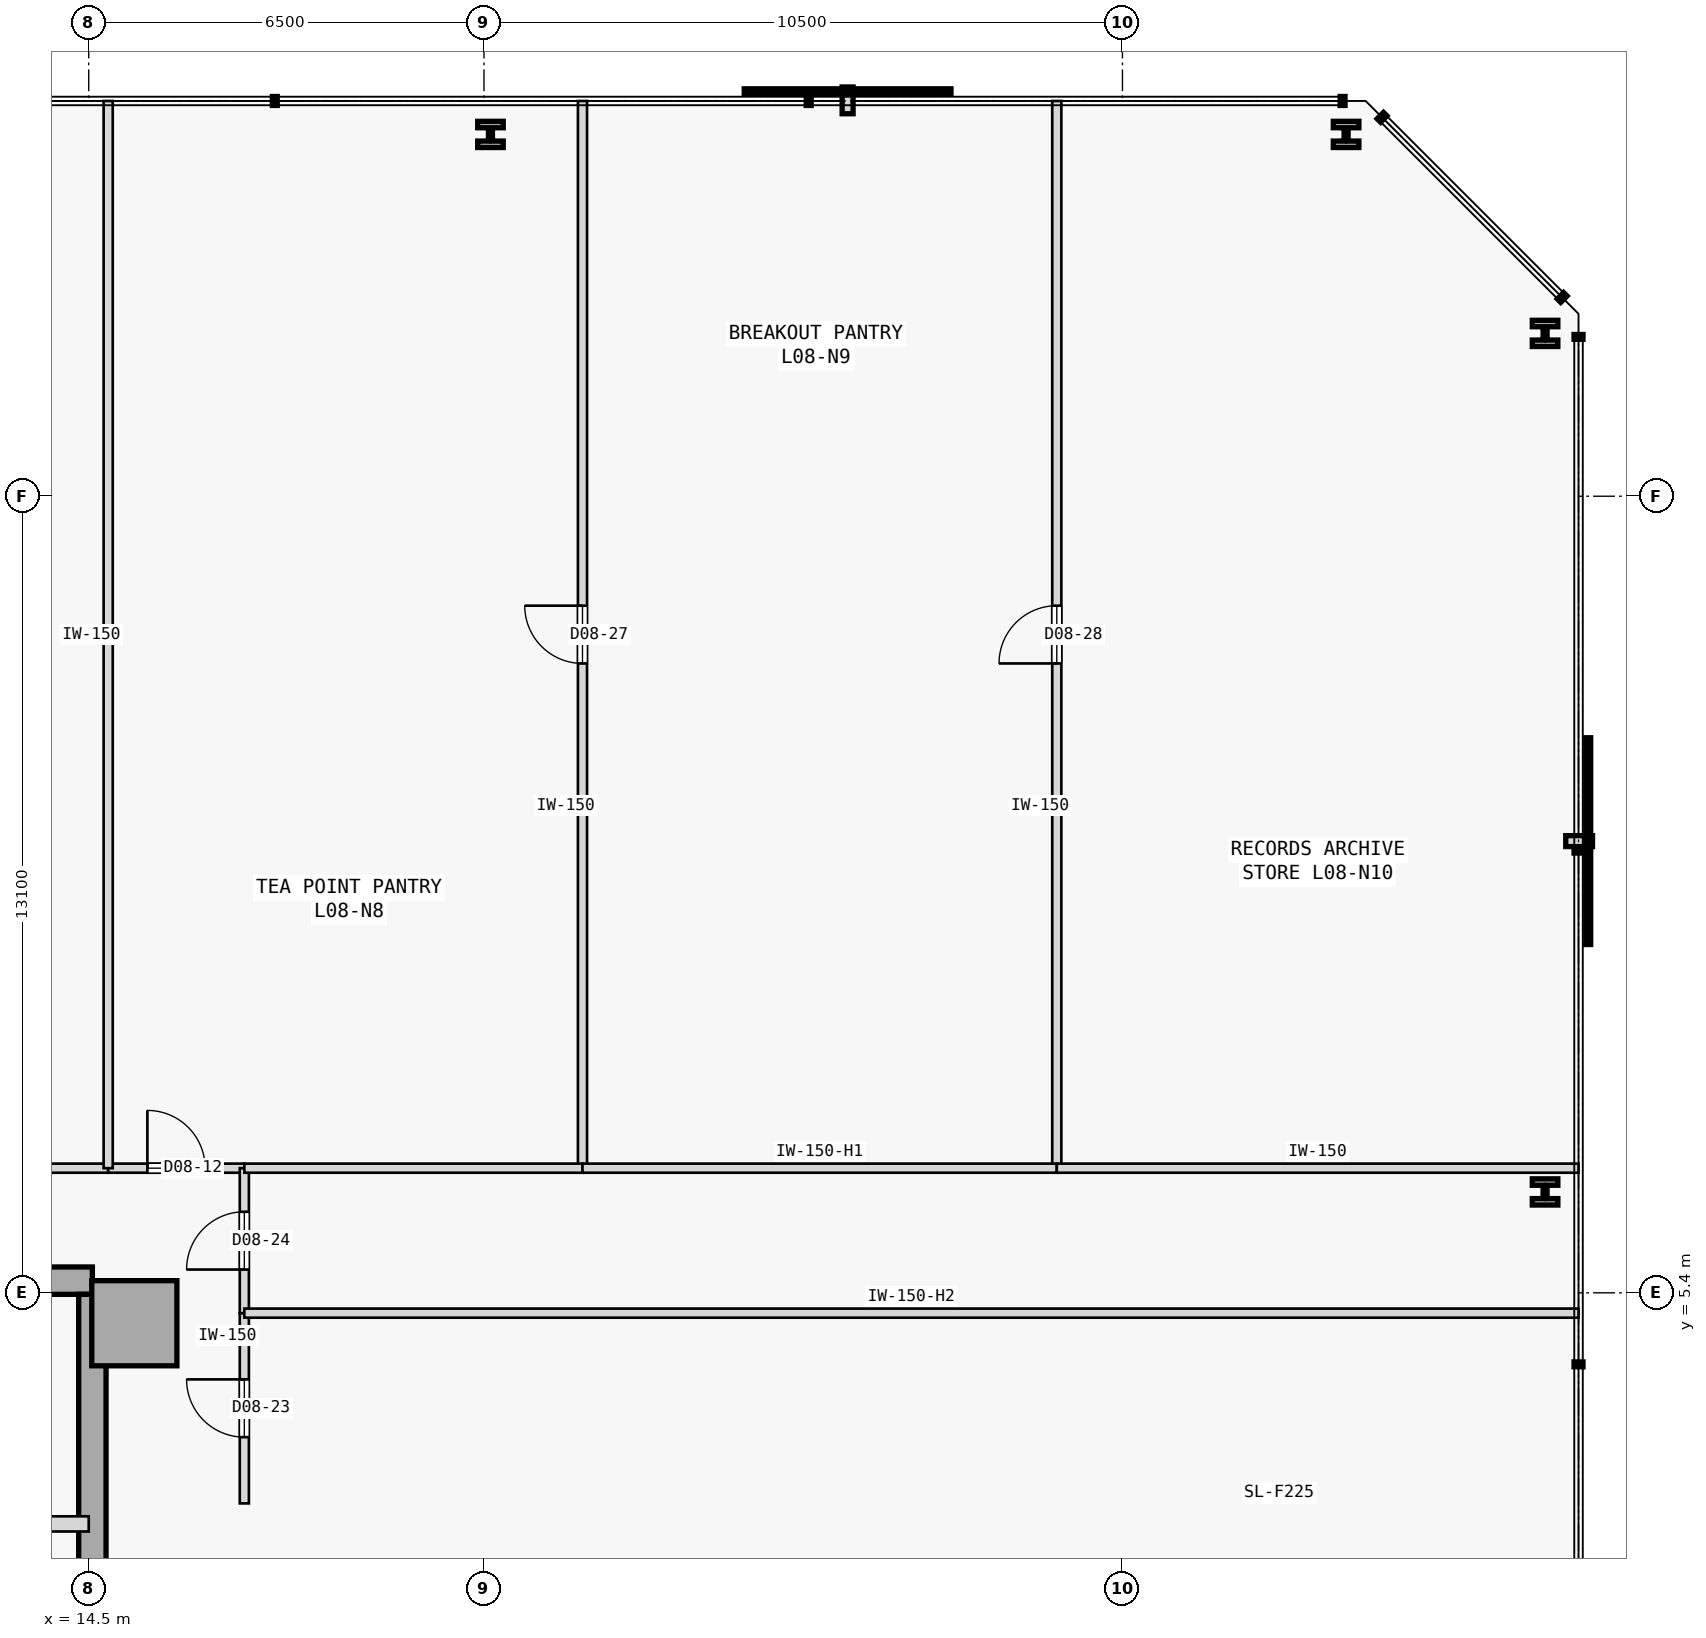
"""IFC4 building model, lengths in metres.
Left out: names, types, materials, properties, quantities, classifications, styles, units other than length and angle.
Written with IfcOpenShell. Run it as: python <this file> out.ifc"""

import sys

from ifc_helpers import new_model, si_unit, direction, frame, frame_2d, origin, origin_2d, place, context, subcontext, project, spatial, rectangle, i_section, extrude, element, fill, save


model = new_model("IFC4")
c1 = context("Model", 3, precision=1e-05, world=origin(), true_north=direction((0.0, 1.0)))
c2 = subcontext(c1, "Body", "Model", "MODEL_VIEW")
j1 = project(units=[si_unit("LENGTHUNIT", "METRE"), si_unit("PLANEANGLEUNIT", "RADIAN")], contexts=[c1])
p1 = place(None, origin())
s1 = spatial("IfcSite", under=j1, at=p1, CompositionType="ELEMENT")
p2 = place(p1, origin())
s2 = spatial("IfcBuilding", under=s1, at=p2, CompositionType="ELEMENT")
p3 = place(p2, frame((0.0, 0.0, 37.0)))
s3 = spatial("IfcBuildingStorey", under=s2, at=p3, CompositionType="ELEMENT", Elevation=37.0)
p4 = place(p3, frame((15.25, 4.9, 0.0), z_axis=(0.0, 0.0, 1.0), x_axis=(1.0, 0.0, 0.0)))
e1 = element("IfcColumn", 1, at=p4, inside=s3, PredefinedType="COLUMN", context=c2, shape_type="SweptSolid", body=[
    extrude(rectangle(XDim=1.4, YDim=1.4, at=origin_2d()), origin(), (0.0, 0.0, 1.0), 3.8),
])
p5 = place(p3, frame((3.15, 5.6, 0.0), z_axis=(0.0, 0.0, 1.0), x_axis=(1.0, 0.0, 0.0)))
e2 = element("IfcWall", 2, at=p5, inside=s3, PredefinedType="SHEAR", context=c2, shape_type="SweptSolid", body=[
    extrude(rectangle(XDim=11.41, YDim=0.45, at=frame_2d((5.705, 0.0))), origin(), (0.0, 0.0, 1.0), 3.575),
])
p6 = place(p3, frame((14.56, -5.375, 0.0), z_axis=(0.0, 0.0, 1.0), x_axis=(0.0, 1.0, 0.0)))
e3 = element("IfcWall", 3, at=p6, inside=s3, PredefinedType="SHEAR", context=c2, shape_type="SweptSolid", body=[
    extrude(rectangle(XDim=10.75, YDim=0.45, at=frame_2d((5.375, 0.0))), origin(), (0.0, 0.0, 1.0), 3.575),
])
for number, where, z_axis, x_axis in (
    (4, (38.45, 7.059, 0.0), (0.0, 0.0, 1.0), (1.0, 0.0, 0.0)),
    (5, (38.45, 21.178, 0.0), (0.0, 0.0, 1.0), (1.0, 0.0, 0.0)),
    (6, (35.178, 24.45, 0.0), (0.0, 0.0, 1.0), (1.0, 0.0, 0.0)),
    (7, (21.107, 24.45, 0.0), (0.0, 0.0, 1.0), (1.0, 0.0, 0.0)),
):
    element("IfcColumn", number, at=place(p3, frame(where, z_axis=z_axis, x_axis=x_axis)), inside=s3, PredefinedType="COLUMN", context=c2, shape_type="SweptSolid", body=[
        extrude(i_section(OverallWidth=0.42, OverallDepth=0.431, WebThickness=0.065, FlangeThickness=0.106, FilletRadius=0.015, at=origin_2d()), origin(), (0.0, 0.0, 1.0), 3.8),
    ])
p7 = place(p3, frame((10.9, 1.6, 0.0), z_axis=(0.0, 0.0, 1.0), x_axis=(1.0, 0.0, 0.0)))
e8 = element("IfcWall", 8, at=p7, inside=s3, PredefinedType="STANDARD", context=c2, shape_type="SweptSolid", body=[
    extrude(rectangle(XDim=3.6, YDim=0.25, at=frame_2d((1.8, 0.0))), origin(), (0.0, 0.0, 1.0), 3.575),
])
p8 = place(p7, frame((1.62, 0.0, 0.0)))
e9 = element("IfcOpeningElement", 9, at=p8, cuts=e8, PredefinedType="OPENING", context=c2, shape_type="SweptSolid", body=[
    extrude(rectangle(XDim=1.05, YDim=2.15, at=frame_2d((0.525, 1.075))), frame((0.0, 0.135, 0.0), z_axis=(0.0, -1.0, 0.0), x_axis=(1.0, 0.0, 0.0)), (0.0, 0.0, 1.0), 0.27),
])
p9 = place(p3, frame((7.02, 7.45, 0.0), z_axis=(0.0, 0.0, 1.0), x_axis=(1.0, 0.0, 0.0)))
e10 = element("IfcWall", 10, at=p9, inside=s3, PredefinedType="PARTITIONING", context=c2, shape_type="SweptSolid", body=[
    extrude(rectangle(XDim=7.8, YDim=0.15, at=frame_2d((3.9, 0.0))), origin(), (0.0, 0.0, 1.0), 3.575),
])
p10 = place(p9, frame((3.425, 0.0, 0.0)))
e11 = element("IfcOpeningElement", 11, at=p10, cuts=e10, PredefinedType="OPENING", context=c2, shape_type="SweptSolid", body=[
    extrude(rectangle(XDim=0.95, YDim=2.15, at=frame_2d((0.475, 1.075))), frame((0.0, 0.085, 0.0), z_axis=(0.0, -1.0, 0.0), x_axis=(1.0, 0.0, 0.0)), (0.0, 0.0, 1.0), 0.17),
])
p11 = place(p3, frame((14.82, 7.45, 0.0), z_axis=(0.0, 0.0, 1.0), x_axis=(1.0, 0.0, 0.0)))
e12 = element("IfcWall", 12, at=p11, inside=s3, PredefinedType="PARTITIONING", context=c2, shape_type="SweptSolid", body=[
    extrude(rectangle(XDim=2.239, YDim=0.15, at=frame_2d((1.12, 0.0))), origin(), (0.0, 0.0, 1.0), 3.575),
])
p12 = place(p11, frame((0.645, 0.0, 0.0)))
e13 = element("IfcOpeningElement", 13, at=p12, cuts=e12, PredefinedType="OPENING", context=c2, shape_type="SweptSolid", body=[
    extrude(rectangle(XDim=0.95, YDim=2.15, at=frame_2d((0.475, 1.075))), frame((0.0, 0.085, 0.0), z_axis=(0.0, -1.0, 0.0), x_axis=(1.0, 0.0, 0.0)), (0.0, 0.0, 1.0), 0.17),
])
p13 = place(p3, frame((17.059, 1.937, 0.0), z_axis=(0.0, 0.0, 1.0), x_axis=(0.0, 1.0, 0.0)))
e14 = element("IfcWall", 14, at=p13, inside=s3, PredefinedType="PARTITIONING", context=c2, shape_type="SweptSolid", body=[
    extrude(rectangle(XDim=3.129, YDim=0.15, at=frame_2d((1.564, 0.0))), origin(), (0.0, 0.0, 1.0), 3.575),
])
p14 = place(p13, frame((1.09, 0.0, 0.0)))
e15 = element("IfcOpeningElement", 15, at=p14, cuts=e14, PredefinedType="OPENING", context=c2, shape_type="SweptSolid", body=[
    extrude(rectangle(XDim=0.95, YDim=2.15, at=frame_2d((0.475, 1.075))), frame((0.0, 0.085, 0.0), z_axis=(0.0, -1.0, 0.0), x_axis=(1.0, 0.0, 0.0)), (0.0, 0.0, 1.0), 0.17),
])
p15 = place(p3, frame((17.059, 5.066, 0.0), z_axis=(0.0, 0.0, 1.0), x_axis=(0.0, 1.0, 0.0)))
e16 = element("IfcWall", 16, at=p15, inside=s3, PredefinedType="PARTITIONING", context=c2, shape_type="SweptSolid", body=[
    extrude(rectangle(XDim=2.384, YDim=0.15, at=frame_2d((1.192, 0.0))), origin(), (0.0, 0.0, 1.0), 3.575),
])
p16 = place(p15, frame((0.717, 0.0, 0.0)))
e17 = element("IfcOpeningElement", 17, at=p16, cuts=e16, PredefinedType="OPENING", context=c2, shape_type="SweptSolid", body=[
    extrude(rectangle(XDim=0.95, YDim=2.15, at=frame_2d((0.475, 1.075))), frame((0.0, 0.085, 0.0), z_axis=(0.0, -1.0, 0.0), x_axis=(1.0, 0.0, 0.0)), (0.0, 0.0, 1.0), 0.17),
])
p17 = place(p3, frame((14.82, 7.45, 0.0), z_axis=(0.0, 0.0, 1.0), x_axis=(0.0, 1.0, 0.0)))
e18 = element("IfcWall", 18, at=p17, inside=s3, PredefinedType="PARTITIONING", context=c2, shape_type="SweptSolid", body=[
    extrude(rectangle(XDim=17.55, YDim=0.15, at=frame_2d((8.775, 0.0))), origin(), (0.0, 0.0, 1.0), 3.575),
])
p18 = place(p3, frame((22.62, 7.45, 0.0), z_axis=(0.0, 0.0, 1.0), x_axis=(0.0, 1.0, 0.0)))
e19 = element("IfcWall", 19, at=p18, inside=s3, PredefinedType="PARTITIONING", context=c2, shape_type="SweptSolid", body=[
    extrude(rectangle(XDim=17.55, YDim=0.15, at=frame_2d((8.775, 0.0))), origin(), (0.0, 0.0, 1.0), 3.575),
])
p19 = place(p18, frame((8.3, 0.0, 0.0)))
e20 = element("IfcOpeningElement", 20, at=p19, cuts=e19, PredefinedType="OPENING", context=c2, shape_type="SweptSolid", body=[
    extrude(rectangle(XDim=0.95, YDim=2.15, at=frame_2d((0.475, 1.075))), frame((0.0, 0.085, 0.0), z_axis=(0.0, -1.0, 0.0), x_axis=(1.0, 0.0, 0.0)), (0.0, 0.0, 1.0), 0.17),
])
p20 = place(p3, frame((17.059, 7.45, 0.0), z_axis=(0.0, 0.0, 1.0), x_axis=(1.0, 0.0, 0.0)))
e21 = element("IfcWall", 21, at=p20, inside=s3, PredefinedType="PARTITIONING", context=c2, shape_type="SweptSolid", body=[
    extrude(rectangle(XDim=5.561, YDim=0.15, at=frame_2d((2.781, 0.0))), origin(), (0.0, 0.0, 1.0), 3.575),
])
p21 = place(p3, frame((30.42, 7.45, 0.0), z_axis=(0.0, 0.0, 1.0), x_axis=(0.0, 1.0, 0.0)))
e22 = element("IfcWall", 22, at=p21, inside=s3, PredefinedType="PARTITIONING", context=c2, shape_type="SweptSolid", body=[
    extrude(rectangle(XDim=17.55, YDim=0.15, at=frame_2d((8.775, 0.0))), origin(), (0.0, 0.0, 1.0), 3.575),
])
p22 = place(p21, frame((8.3, 0.0, 0.0)))
e23 = element("IfcOpeningElement", 23, at=p22, cuts=e22, PredefinedType="OPENING", context=c2, shape_type="SweptSolid", body=[
    extrude(rectangle(XDim=0.95, YDim=2.15, at=frame_2d((0.475, 1.075))), frame((0.0, 0.085, 0.0), z_axis=(0.0, -1.0, 0.0), x_axis=(1.0, 0.0, 0.0)), (0.0, 0.0, 1.0), 0.17),
])
p23 = place(p3, frame((22.62, 7.45, 0.0), z_axis=(0.0, 0.0, 1.0), x_axis=(1.0, 0.0, 0.0)))
e24 = element("IfcWall", 24, at=p23, inside=s3, PredefinedType="PARTITIONING", context=c2, shape_type="SweptSolid", body=[
    extrude(rectangle(XDim=7.8, YDim=0.15, at=frame_2d((3.9, 0.0))), origin(), (0.0, 0.0, 1.0), 3.125),
])
p24 = place(p3, frame((30.42, 7.45, 0.0), z_axis=(0.0, 0.0, 1.0), x_axis=(1.0, 0.0, 0.0)))
e25 = element("IfcWall", 25, at=p24, inside=s3, PredefinedType="PARTITIONING", context=c2, shape_type="SweptSolid", body=[
    extrude(rectangle(XDim=8.58, YDim=0.15, at=frame_2d((4.29, 0.0))), origin(), (0.0, 0.0, 1.0), 3.575),
])
p25 = place(p3, frame((17.059, 5.066, 0.0), z_axis=(0.0, 0.0, 1.0), x_axis=(1.0, 0.0, 0.0)))
e26 = element("IfcWall", 26, at=p25, inside=s3, PredefinedType="PARTITIONING", context=c2, shape_type="SweptSolid", body=[
    extrude(rectangle(XDim=21.941, YDim=0.15, at=frame_2d((10.97, 0.0))), origin(), (0.0, 0.0, 1.0), 2.975),
])
p26 = place(p12, origin())
e27 = element("IfcDoor", 27, at=p26, inside=s3, OperationType="SINGLE_SWING_LEFT", PredefinedType="DOOR", context=c2, shape_type="SweptSolid", body=[
    extrude(rectangle(XDim=0.95, YDim=2.15, at=frame_2d((0.475, 1.075))), frame((0.0, 0.025, 0.0), z_axis=(0.0, -1.0, 0.0), x_axis=(1.0, 0.0, 0.0)), (0.0, 0.0, 1.0), 0.05),
])
fill(e13, e27)
p27 = place(p14, origin())
e28 = element("IfcDoor", 28, at=p27, inside=s3, OperationType="SINGLE_SWING_RIGHT", PredefinedType="DOOR", context=c2, shape_type="SweptSolid", body=[
    extrude(rectangle(XDim=0.95, YDim=2.15, at=frame_2d((0.475, 1.075))), frame((0.0, 0.025, 0.0), z_axis=(0.0, -1.0, 0.0), x_axis=(1.0, 0.0, 0.0)), (0.0, 0.0, 1.0), 0.05),
])
fill(e15, e28)
p28 = place(p16, origin())
e29 = element("IfcDoor", 29, at=p28, inside=s3, OperationType="SINGLE_SWING_LEFT", PredefinedType="DOOR", context=c2, shape_type="SweptSolid", body=[
    extrude(rectangle(XDim=0.95, YDim=2.15, at=frame_2d((0.475, 1.075))), frame((0.0, 0.025, 0.0), z_axis=(0.0, -1.0, 0.0), x_axis=(1.0, 0.0, 0.0)), (0.0, 0.0, 1.0), 0.05),
])
fill(e17, e29)
p29 = place(p19, origin())
e30 = element("IfcDoor", 30, at=p29, inside=s3, OperationType="SINGLE_SWING_RIGHT", PredefinedType="DOOR", context=c2, shape_type="SweptSolid", body=[
    extrude(rectangle(XDim=0.95, YDim=2.15, at=frame_2d((0.475, 1.075))), frame((0.0, 0.025, 0.0), z_axis=(0.0, -1.0, 0.0), x_axis=(1.0, 0.0, 0.0)), (0.0, 0.0, 1.0), 0.05),
])
fill(e20, e30)
p30 = place(p22, origin())
e31 = element("IfcDoor", 31, at=p30, inside=s3, OperationType="SINGLE_SWING_LEFT", PredefinedType="DOOR", context=c2, shape_type="SweptSolid", body=[
    extrude(rectangle(XDim=0.95, YDim=2.15, at=frame_2d((0.475, 1.075))), frame((0.0, 0.025, 0.0), z_axis=(0.0, -1.0, 0.0), x_axis=(1.0, 0.0, 0.0)), (0.0, 0.0, 1.0), 0.05),
])
fill(e23, e31)
save(model, sys.argv[1])
